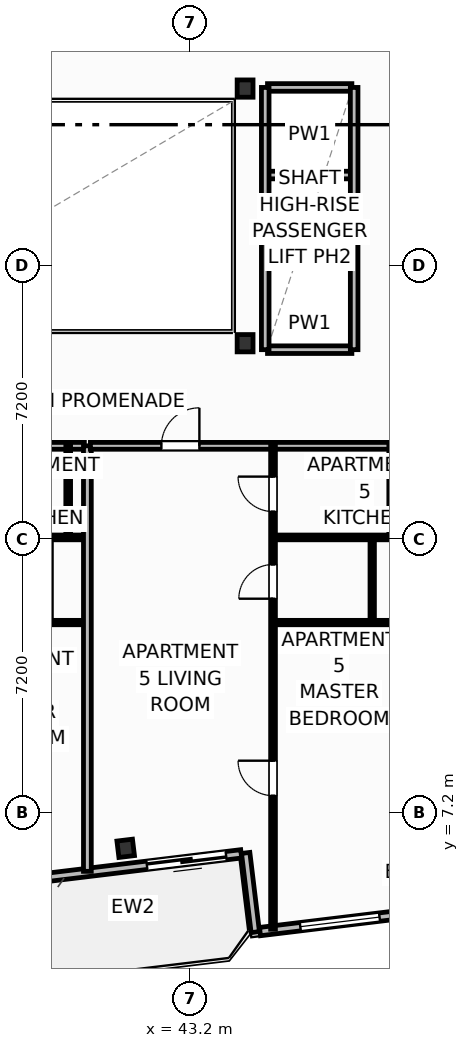
"""IFC4 building model, lengths in metres.
Left out: names, types, materials, properties, quantities, classifications, styles, units other than length and angle.
Written with IfcOpenShell. Run it as: python <this file> out.ifc"""

import sys

from ifc_helpers import new_model, si_unit, direction, frame, frame_2d, origin, origin_2d, place, context, subcontext, project, spatial, rectangle, i_section, extrude, element, fill, save


model = new_model("IFC4")
c1 = context("Model", 3, precision=1e-05, world=origin(), true_north=direction((0.0, 1.0)))
c2 = subcontext(c1, "Body", "Model", "MODEL_VIEW")
j1 = project(units=[si_unit("LENGTHUNIT", "METRE"), si_unit("PLANEANGLEUNIT", "RADIAN")], contexts=[c1])
p1 = place(None, origin())
s1 = spatial("IfcSite", under=j1, at=p1, CompositionType="ELEMENT")
p2 = place(p1, origin())
s2 = spatial("IfcBuilding", under=s1, at=p2, CompositionType="ELEMENT")
p3 = place(p2, frame((0.0, 0.0, 196.8)))
s3 = spatial("IfcBuildingStorey", under=s2, at=p3, CompositionType="ELEMENT", Elevation=196.8)
for number, where, z_axis, x_axis in (
    (1, (44.65, 19.55, 0.0), (0.0, 0.0, 1.0), (1.0, 0.0, 0.0)),
    (2, (44.65, 26.25, 0.0), (0.0, 0.0, 1.0), (1.0, 0.0, 0.0)),
):
    element("IfcColumn", number, at=place(p3, frame(where, z_axis=z_axis, x_axis=x_axis)), inside=s3, PredefinedType="COLUMN", context=c2, shape_type="SweptSolid", body=[
        extrude(i_section(OverallWidth=0.418, OverallDepth=0.455, WebThickness=0.042, FlangeThickness=0.068, FilletRadius=0.025, at=origin_2d()), origin(), (0.0, 0.0, 1.0), 3.7),
    ])
p4 = place(p3, frame((41.508, 6.26, 0.0), z_axis=(0.0, 0.0, 1.0), x_axis=(0.992732158755, 0.12034475881, 0.0)))
e3 = element("IfcColumn", 3, at=p4, inside=s3, PredefinedType="COLUMN", context=c2, shape_type="SweptSolid", body=[
    extrude(i_section(OverallWidth=0.412, OverallDepth=0.435, WebThickness=0.036, FlangeThickness=0.057, FilletRadius=0.025, at=origin_2d()), origin(), (0.0, 0.0, 1.0), 3.7),
])
p5 = place(p3, frame((44.548, 6.114, 0.0), z_axis=(0.0, 0.0, 1.0), x_axis=(-0.992735402148, -0.120318000826, 0.0)))
e4 = element("IfcWall", 4, at=p5, inside=s3, PredefinedType="SOLIDWALL", context=c2, shape_type="SweptSolid", body=[
    extrude(rectangle(XDim=6.0, YDim=0.22, at=frame_2d((3.0, 0.0))), origin(), (0.0, 0.0, 1.0), 2.73),
])
p6 = place(p5, frame((0.4, 0.0, 0.0)))
e5 = element("IfcOpeningElement", 5, at=p6, cuts=e4, PredefinedType="OPENING", context=c2, shape_type="SweptSolid", body=[
    extrude(rectangle(XDim=2.1, YDim=2.3, at=frame_2d((1.05, 1.15))), frame((0.0, 0.12, 0.0), z_axis=(0.0, -1.0, 0.0), x_axis=(1.0, 0.0, 0.0)), (0.0, 0.0, 1.0), 0.24),
])
p7 = place(p3, frame((44.666, 6.138, 0.0), z_axis=(0.0, 0.0, 1.0), x_axis=(0.120327895535, -0.992734202874, 0.0)))
e6 = element("IfcWall", 6, at=p7, inside=s3, PredefinedType="SOLIDWALL", context=c2, shape_type="SweptSolid", body=[
    extrude(rectangle(XDim=2.1, YDim=0.22, at=frame_2d((1.05, 0.0))), origin(), (0.0, 0.0, 1.0), 2.73),
])
p8 = place(p3, frame((45.042, 4.069, 0.0), z_axis=(0.0, 0.0, 1.0), x_axis=(0.992731032022, 0.120354052946, 0.0)))
e7 = element("IfcWall", 7, at=p8, inside=s3, PredefinedType="SOLIDWALL", context=c2, shape_type="SweptSolid", body=[
    extrude(rectangle(XDim=8.035, YDim=0.22, at=frame_2d((4.018, 0.0))), origin(), (0.0, 0.0, 1.0), 2.73),
])
p9 = place(p8, frame((1.068, 0.0, 0.8)))
e8 = element("IfcOpeningElement", 8, at=p9, cuts=e7, PredefinedType="OPENING", context=c2, shape_type="SweptSolid", body=[
    extrude(rectangle(XDim=2.1, YDim=1.75, at=frame_2d((1.05, 0.875))), frame((0.0, 0.12, 0.0), z_axis=(0.0, -1.0, 0.0), x_axis=(1.0, 0.0, 0.0)), (0.0, 0.0, 1.0), 0.24),
])
p10 = place(p3, frame((32.08, 16.85, 0.0), z_axis=(0.0, 0.0, 1.0), x_axis=(1.0, 0.0, 0.0)))
e9 = element("IfcWall", 9, at=p10, inside=s3, PredefinedType="PARTITIONING", context=c2, shape_type="SweptSolid", body=[
    extrude(rectangle(XDim=8.34, YDim=0.18, at=frame_2d((4.17, 0.0))), origin(), (0.0, 0.0, 1.0), 3.45),
])
p11 = place(p10, frame((1.868, 0.0, 0.0)))
e10 = element("IfcOpeningElement", 10, at=p11, cuts=e9, PredefinedType="OPENING", context=c2, shape_type="SweptSolid", body=[
    extrude(rectangle(XDim=1.0, YDim=2.2, at=frame_2d((0.5, 1.1))), frame((0.0, 0.1, 0.0), z_axis=(0.0, -1.0, 0.0), x_axis=(1.0, 0.0, 0.0)), (0.0, 0.0, 1.0), 0.2),
])
p12 = place(p3, frame((36.955, 14.44, 0.0), z_axis=(0.0, 0.0, 1.0), x_axis=(1.0, 0.0, 0.0)))
e11 = element("IfcWall", 11, at=p12, inside=s3, PredefinedType="PARTITIONING", context=c2, shape_type="SweptSolid", body=[
    extrude(rectangle(XDim=3.465, YDim=0.125, at=frame_2d((1.732, 0.0))), origin(), (0.0, 0.0, 1.0), 3.45),
])
p13 = place(p3, frame((36.955, 12.2, 0.0), z_axis=(0.0, 0.0, 1.0), x_axis=(1.0, 0.0, 0.0)))
e12 = element("IfcWall", 12, at=p13, inside=s3, PredefinedType="PARTITIONING", context=c2, shape_type="SweptSolid", body=[
    extrude(rectangle(XDim=3.465, YDim=0.115, at=frame_2d((1.732, 0.0))), origin(), (0.0, 0.0, 1.0), 3.45),
])
p14 = place(p3, frame((39.995, 14.44, 0.0), z_axis=(0.0, 0.0, 1.0), x_axis=(0.0, 1.0, 0.0)))
e13 = element("IfcWall", 13, at=p14, inside=s3, PredefinedType="PARTITIONING", context=c2, shape_type="SweptSolid", body=[
    extrude(rectangle(XDim=2.41, YDim=0.125, at=frame_2d((1.205, 0.0))), origin(), (0.0, 0.0, 1.0), 3.45),
])
p15 = place(p3, frame((40.5, 5.654, 0.0), z_axis=(0.0, 0.0, 1.0), x_axis=(0.0, 1.0, 0.0)))
e14 = element("IfcWall", 14, at=p15, inside=s3, PredefinedType="PARTITIONING", context=c2, shape_type="SweptSolid", body=[
    extrude(rectangle(XDim=11.196, YDim=0.205, at=frame_2d((5.598, 0.0))), origin(), (0.0, 0.0, 1.0), 3.45),
])
p16 = place(p3, frame((40.58, 16.85, 0.0), z_axis=(0.0, 0.0, 1.0), x_axis=(1.0, 0.0, 0.0)))
e15 = element("IfcWall", 15, at=p16, inside=s3, PredefinedType="PARTITIONING", context=c2, shape_type="SweptSolid", body=[
    extrude(rectangle(XDim=8.34, YDim=0.18, at=frame_2d((4.17, 0.0))), origin(), (0.0, 0.0, 1.0), 3.45),
])
p17 = place(p16, frame((1.868, 0.0, 0.0)))
e16 = element("IfcOpeningElement", 16, at=p17, cuts=e15, PredefinedType="OPENING", context=c2, shape_type="SweptSolid", body=[
    extrude(rectangle(XDim=1.0, YDim=2.2, at=frame_2d((0.5, 1.1))), frame((0.0, 0.1, 0.0), z_axis=(0.0, -1.0, 0.0), x_axis=(1.0, 0.0, 0.0)), (0.0, 0.0, 1.0), 0.2),
])
p18 = place(p3, frame((45.385, 4.131, 0.0), z_axis=(0.0, 0.0, 1.0), x_axis=(0.0, 1.0, 0.0)))
e17 = element("IfcWall", 17, at=p18, inside=s3, PredefinedType="PARTITIONING", context=c2, shape_type="SweptSolid", body=[
    extrude(rectangle(XDim=12.719, YDim=0.125, at=frame_2d((6.36, 0.0))), origin(), (0.0, 0.0, 1.0), 3.45),
])
p19 = place(p18, frame((3.515, 0.0, 0.0)))
e18 = element("IfcOpeningElement", 18, at=p19, cuts=e17, PredefinedType="OPENING", context=c2, shape_type="SweptSolid", body=[
    extrude(rectangle(XDim=0.92, YDim=2.05, at=frame_2d((0.46, 1.025))), frame((0.0, 0.073, 0.0), z_axis=(0.0, -1.0, 0.0), x_axis=(1.0, 0.0, 0.0)), (0.0, 0.0, 1.0), 0.145),
])
p20 = place(p18, frame((8.697, 0.0, 0.0)))
e19 = element("IfcOpeningElement", 19, at=p20, cuts=e17, PredefinedType="OPENING", context=c2, shape_type="SweptSolid", body=[
    extrude(rectangle(XDim=0.9, YDim=2.05, at=frame_2d((0.45, 1.025))), frame((0.0, 0.073, 0.0), z_axis=(0.0, -1.0, 0.0), x_axis=(1.0, 0.0, 0.0)), (0.0, 0.0, 1.0), 0.145),
])
p21 = place(p18, frame((10.99, 0.0, 0.0)))
e20 = element("IfcOpeningElement", 20, at=p21, cuts=e17, PredefinedType="OPENING", context=c2, shape_type="SweptSolid", body=[
    extrude(rectangle(XDim=0.92, YDim=2.05, at=frame_2d((0.46, 1.025))), frame((0.0, 0.073, 0.0), z_axis=(0.0, -1.0, 0.0), x_axis=(1.0, 0.0, 0.0)), (0.0, 0.0, 1.0), 0.145),
])
p22 = place(p3, frame((45.455, 14.44, 0.0), z_axis=(0.0, 0.0, 1.0), x_axis=(1.0, 0.0, 0.0)))
e21 = element("IfcWall", 21, at=p22, inside=s3, PredefinedType="PARTITIONING", context=c2, shape_type="SweptSolid", body=[
    extrude(rectangle(XDim=3.465, YDim=0.125, at=frame_2d((1.732, 0.0))), origin(), (0.0, 0.0, 1.0), 3.45),
])
p23 = place(p3, frame((45.455, 12.2, 0.0), z_axis=(0.0, 0.0, 1.0), x_axis=(1.0, 0.0, 0.0)))
e22 = element("IfcWall", 22, at=p23, inside=s3, PredefinedType="PARTITIONING", context=c2, shape_type="SweptSolid", body=[
    extrude(rectangle(XDim=3.465, YDim=0.115, at=frame_2d((1.732, 0.0))), origin(), (0.0, 0.0, 1.0), 3.45),
])
p24 = place(p3, frame((48.495, 14.44, 0.0), z_axis=(0.0, 0.0, 1.0), x_axis=(0.0, 1.0, 0.0)))
e23 = element("IfcWall", 23, at=p24, inside=s3, PredefinedType="PARTITIONING", context=c2, shape_type="SweptSolid", body=[
    extrude(rectangle(XDim=2.41, YDim=0.125, at=frame_2d((1.205, 0.0))), origin(), (0.0, 0.0, 1.0), 3.45),
])
p25 = place(p3, frame((47.995, 12.2, 0.0), z_axis=(0.0, 0.0, 1.0), x_axis=(0.0, 1.0, 0.0)))
e24 = element("IfcWall", 24, at=p25, inside=s3, PredefinedType="PARTITIONING", context=c2, shape_type="SweptSolid", body=[
    extrude(rectangle(XDim=2.24, YDim=0.115, at=frame_2d((1.12, 0.0))), origin(), (0.0, 0.0, 1.0), 3.45),
])
for number, where, z_axis, x_axis in (
    (25, (45.24, 21.675, 0.0), (0.0, 0.0, 1.0), (1.0, 0.0, 0.0)),
    (26, (45.24, 23.975, 0.0), (0.0, 0.0, 1.0), (1.0, 0.0, 0.0)),
):
    element("IfcWall", number, at=place(p3, frame(where, z_axis=z_axis, x_axis=x_axis)), inside=s3, PredefinedType="PARTITIONING", context=c2, shape_type="SweptSolid", body=[
        extrude(rectangle(XDim=2.22, YDim=0.2, at=frame_2d((1.11, 0.0))), origin(), (0.0, 0.0, 1.0), 3.45),
    ])
p26 = place(p3, frame((45.24, 19.38, 0.0), z_axis=(0.0, 0.0, 1.0), x_axis=(1.0, 0.0, 0.0)))
e27 = element("IfcWall", 27, at=p26, inside=s3, PredefinedType="PARTITIONING", context=c2, shape_type="SweptSolid", body=[
    extrude(rectangle(XDim=2.22, YDim=0.2, at=frame_2d((1.11, 0.0))), origin(), (0.0, 0.0, 1.0), 2.662),
])
p27 = place(p3, frame((45.24, 26.28, 0.0), z_axis=(0.0, 0.0, 1.0), x_axis=(1.0, 0.0, 0.0)))
e28 = element("IfcWall", 28, at=p27, inside=s3, PredefinedType="PARTITIONING", context=c2, shape_type="SweptSolid", body=[
    extrude(rectangle(XDim=2.22, YDim=0.2, at=frame_2d((1.11, 0.0))), origin(), (0.0, 0.0, 1.0), 3.45),
])
for number, where, z_axis, x_axis in (
    (29, (45.18, 19.38, 0.0), (0.0, 0.0, 1.0), (0.0, 1.0, 0.0)),
    (30, (47.52, 19.38, 0.0), (0.0, 0.0, 1.0), (0.0, 1.0, 0.0)),
):
    element("IfcWall", number, at=place(p3, frame(where, z_axis=z_axis, x_axis=x_axis)), inside=s3, PredefinedType="PARTITIONING", context=c2, shape_type="SweptSolid", body=[
        extrude(rectangle(XDim=6.9, YDim=0.2, at=frame_2d((3.45, 0.0))), origin(), (0.0, 0.0, 1.0), 3.45),
    ])
p28 = place(p6, origin())
e31 = element("IfcDoor", 31, at=p28, inside=s3, OperationType="SLIDING_TO_LEFT", PredefinedType="DOOR", context=c2, shape_type="SweptSolid", body=[
    extrude(rectangle(XDim=2.1, YDim=2.3, at=frame_2d((1.05, 1.15))), frame((0.0, 0.025, 0.0), z_axis=(0.0, -1.0, 0.0), x_axis=(1.0, 0.0, 0.0)), (0.0, 0.0, 1.0), 0.05),
])
fill(e5, e31)
p29 = place(p9, origin())
e32 = element("IfcWindow", 32, at=p29, inside=s3, PartitioningType="SINGLE_PANEL", PredefinedType="WINDOW", context=c2, shape_type="SweptSolid", body=[
    extrude(rectangle(XDim=2.1, YDim=1.75, at=frame_2d((1.05, 0.875))), frame((0.0, 0.03, 0.0), z_axis=(0.0, -1.0, 0.0), x_axis=(1.0, 0.0, 0.0)), (0.0, 0.0, 1.0), 0.06),
])
fill(e8, e32)
p30 = place(p17, origin())
e33 = element("IfcDoor", 33, at=p30, inside=s3, OperationType="SINGLE_SWING_RIGHT", PredefinedType="DOOR", context=c2, shape_type="SweptSolid", body=[
    extrude(rectangle(XDim=1.0, YDim=2.2, at=frame_2d((0.5, 1.1))), frame((0.0, 0.025, 0.0), z_axis=(0.0, -1.0, 0.0), x_axis=(1.0, 0.0, 0.0)), (0.0, 0.0, 1.0), 0.05),
])
fill(e16, e33)
p31 = place(p19, origin())
e34 = element("IfcDoor", 34, at=p31, inside=s3, OperationType="SINGLE_SWING_RIGHT", PredefinedType="DOOR", context=c2, shape_type="SweptSolid", body=[
    extrude(rectangle(XDim=0.92, YDim=2.05, at=frame_2d((0.46, 1.025))), frame((0.0, 0.025, 0.0), z_axis=(0.0, -1.0, 0.0), x_axis=(1.0, 0.0, 0.0)), (0.0, 0.0, 1.0), 0.05),
])
fill(e18, e34)
p32 = place(p20, origin())
e35 = element("IfcDoor", 35, at=p32, inside=s3, OperationType="SINGLE_SWING_LEFT", PredefinedType="DOOR", context=c2, shape_type="SweptSolid", body=[
    extrude(rectangle(XDim=0.9, YDim=2.05, at=frame_2d((0.45, 1.025))), frame((0.0, 0.025, 0.0), z_axis=(0.0, -1.0, 0.0), x_axis=(1.0, 0.0, 0.0)), (0.0, 0.0, 1.0), 0.05),
])
fill(e19, e35)
p33 = place(p21, origin())
e36 = element("IfcDoor", 36, at=p33, inside=s3, OperationType="SINGLE_SWING_RIGHT", PredefinedType="DOOR", context=c2, shape_type="SweptSolid", body=[
    extrude(rectangle(XDim=0.92, YDim=2.05, at=frame_2d((0.46, 1.025))), frame((0.0, 0.025, 0.0), z_axis=(0.0, -1.0, 0.0), x_axis=(1.0, 0.0, 0.0)), (0.0, 0.0, 1.0), 0.05),
])
fill(e20, e36)
save(model, sys.argv[1])
